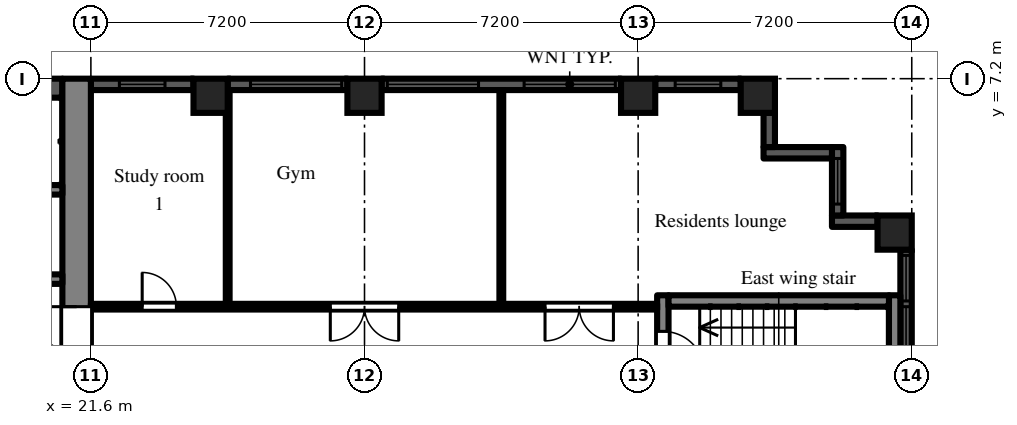
"""IFC4 building model, lengths in metres.
Left out: names, types, materials, properties, quantities, classifications, styles, units other than length and angle.
Written with IfcOpenShell. Run it as: python <this file> out.ifc"""

import sys

from ifc_helpers import new_model, si_unit, direction, frame, frame_2d, origin, origin_2d, place, context, subcontext, project, spatial, rectangle, extrude, element, fill, save


model = new_model("IFC4")
c1 = context("Model", 3, precision=1e-05, world=origin(), true_north=direction((0.0, 1.0)))
c2 = subcontext(c1, "Body", "Model", "MODEL_VIEW")
j1 = project(units=[si_unit("LENGTHUNIT", "METRE"), si_unit("PLANEANGLEUNIT", "RADIAN")], contexts=[c1])
p1 = place(None, origin())
s1 = spatial("IfcSite", under=j1, at=p1, CompositionType="ELEMENT")
p2 = place(p1, origin())
s2 = spatial("IfcBuilding", under=s1, at=p2, CompositionType="ELEMENT")
p3 = place(p2, frame((0.0, 0.0, 69.9)))
s3 = spatial("IfcBuildingStorey", under=s2, at=p3, CompositionType="ELEMENT", Elevation=69.9)
for number, where, z_axis, x_axis in (
    (1, (24.75, 6.75, 0.0), (0.0, 0.0, 1.0), (1.0, 0.0, 0.0)),
    (2, (28.8, 6.75, 0.0), (0.0, 0.0, 1.0), (1.0, 0.0, 0.0)),
    (3, (36.0, 6.75, 0.0), (0.0, 0.0, 1.0), (1.0, 0.0, 0.0)),
    (4, (39.15, 6.75, 0.0), (0.0, 0.0, 1.0), (1.0, 0.0, 0.0)),
    (5, (42.75, 3.15, 0.0), (0.0, 0.0, 1.0), (1.0, 0.0, 0.0)),
):
    element("IfcColumn", number, at=place(p3, frame(where, z_axis=z_axis, x_axis=x_axis)), inside=s3, PredefinedType="COLUMN", context=c2, shape_type="SweptSolid", body=[
        extrude(rectangle(XDim=0.9, YDim=0.9, at=origin_2d()), origin(), (0.0, 0.0, 1.0), 3.0),
    ])
p4 = place(p3, frame((43.05, -2.7, 0.0), z_axis=(0.0, 0.0, 1.0), x_axis=(0.0, 1.0, 0.0)))
e6 = element("IfcWall", 6, at=p4, inside=s3, PredefinedType="SOLIDWALL", context=c2, shape_type="SweptSolid", body=[
    extrude(rectangle(XDim=5.4, YDim=0.3, at=frame_2d((2.7, 0.0))), origin(), (0.0, 0.0, 1.0), 2.1),
])
p5 = place(p4, frame((1.5, 0.0, 0.2)))
e7 = element("IfcOpeningElement", 7, at=p5, cuts=e6, PredefinedType="OPENING", context=c2, shape_type="SweptSolid", body=[
    extrude(rectangle(XDim=2.4, YDim=1.85, at=frame_2d((1.2, 0.925))), frame((0.0, 0.16, 0.0), z_axis=(0.0, -1.0, 0.0), x_axis=(1.0, 0.0, 0.0)), (0.0, 0.0, 1.0), 0.32),
])
p6 = place(p4, frame((4.05, 0.0, 0.2)))
e8 = element("IfcOpeningElement", 8, at=p6, cuts=e6, PredefinedType="OPENING", context=c2, shape_type="SweptSolid", body=[
    extrude(rectangle(XDim=1.2, YDim=1.85, at=frame_2d((0.6, 0.925))), frame((0.0, 0.16, 0.0), z_axis=(0.0, -1.0, 0.0), x_axis=(1.0, 0.0, 0.0)), (0.0, 0.0, 1.0), 0.32),
])
p7 = place(p3, frame((42.3, 3.45, 0.0), z_axis=(0.0, 0.0, 1.0), x_axis=(-1.0, 0.0, 0.0)))
e9 = element("IfcWall", 9, at=p7, inside=s3, PredefinedType="SOLIDWALL", context=c2, shape_type="SweptSolid", body=[
    extrude(rectangle(XDim=1.2, YDim=0.3, at=frame_2d((0.6, 0.0))), origin(), (0.0, 0.0, 1.0), 2.575),
])
p8 = place(p3, frame((41.25, 3.6, 0.0), z_axis=(0.0, 0.0, 1.0), x_axis=(0.0, 1.0, 0.0)))
e10 = element("IfcWall", 10, at=p8, inside=s3, PredefinedType="SOLIDWALL", context=c2, shape_type="SweptSolid", body=[
    extrude(rectangle(XDim=1.8, YDim=0.3, at=frame_2d((0.9, 0.0))), origin(), (0.0, 0.0, 1.0), 2.575),
])
p9 = place(p8, frame((0.3, 0.0, 0.2)))
e11 = element("IfcOpeningElement", 11, at=p9, cuts=e10, PredefinedType="OPENING", context=c2, shape_type="SweptSolid", body=[
    extrude(rectangle(XDim=1.2, YDim=1.85, at=frame_2d((0.6, 0.925))), frame((0.0, 0.16, 0.0), z_axis=(0.0, -1.0, 0.0), x_axis=(1.0, 0.0, 0.0)), (0.0, 0.0, 1.0), 0.32),
])
p10 = place(p3, frame((41.1, 5.25, 0.0), z_axis=(0.0, 0.0, 1.0), x_axis=(-1.0, 0.0, 0.0)))
e12 = element("IfcWall", 12, at=p10, inside=s3, PredefinedType="SOLIDWALL", context=c2, shape_type="SweptSolid", body=[
    extrude(rectangle(XDim=1.8, YDim=0.3, at=frame_2d((0.9, 0.0))), origin(), (0.0, 0.0, 1.0), 2.575),
])
p11 = place(p3, frame((39.45, 5.4, 0.0), z_axis=(0.0, 0.0, 1.0), x_axis=(0.0, 1.0, 0.0)))
e13 = element("IfcWall", 13, at=p11, inside=s3, PredefinedType="SOLIDWALL", context=c2, shape_type="SweptSolid", body=[
    extrude(rectangle(XDim=0.9, YDim=0.3, at=frame_2d((0.45, 0.0))), origin(), (0.0, 0.0, 1.0), 2.575),
])
p12 = place(p3, frame((38.7, 7.05, 0.0), z_axis=(0.0, 0.0, 1.0), x_axis=(-1.0, 0.0, 0.0)))
e14 = element("IfcWall", 14, at=p12, inside=s3, PredefinedType="SOLIDWALL", context=c2, shape_type="SweptSolid", body=[
    extrude(rectangle(XDim=2.25, YDim=0.3, at=frame_2d((1.125, 0.0))), origin(), (0.0, 0.0, 1.0), 2.1),
])
p13 = place(p12, frame((0.525, 0.0, 0.2)))
e15 = element("IfcOpeningElement", 15, at=p13, cuts=e14, PredefinedType="OPENING", context=c2, shape_type="SweptSolid", body=[
    extrude(rectangle(XDim=1.2, YDim=1.85, at=frame_2d((0.6, 0.925))), frame((0.0, 0.16, 0.0), z_axis=(0.0, -1.0, 0.0), x_axis=(1.0, 0.0, 0.0)), (0.0, 0.0, 1.0), 0.32),
])
p14 = place(p3, frame((35.55, 7.05, 0.0), z_axis=(0.0, 0.0, 1.0), x_axis=(-1.0, 0.0, 0.0)))
e16 = element("IfcWall", 16, at=p14, inside=s3, PredefinedType="SOLIDWALL", context=c2, shape_type="SweptSolid", body=[
    extrude(rectangle(XDim=6.3, YDim=0.3, at=frame_2d((3.15, 0.0))), origin(), (0.0, 0.0, 1.0), 2.1),
])
p15 = place(p14, frame((0.15, 0.0, 0.2)))
e17 = element("IfcOpeningElement", 17, at=p15, cuts=e16, PredefinedType="OPENING", context=c2, shape_type="SweptSolid", body=[
    extrude(rectangle(XDim=2.4, YDim=1.85, at=frame_2d((1.2, 0.925))), frame((0.0, 0.16, 0.0), z_axis=(0.0, -1.0, 0.0), x_axis=(1.0, 0.0, 0.0)), (0.0, 0.0, 1.0), 0.32),
])
p16 = place(p14, frame((3.75, 0.0, 0.2)))
e18 = element("IfcOpeningElement", 18, at=p16, cuts=e16, PredefinedType="OPENING", context=c2, shape_type="SweptSolid", body=[
    extrude(rectangle(XDim=2.4, YDim=1.85, at=frame_2d((1.2, 0.925))), frame((0.0, 0.16, 0.0), z_axis=(0.0, -1.0, 0.0), x_axis=(1.0, 0.0, 0.0)), (0.0, 0.0, 1.0), 0.32),
])
p17 = place(p3, frame((28.35, 7.05, 0.0), z_axis=(0.0, 0.0, 1.0), x_axis=(-1.0, 0.0, 0.0)))
e19 = element("IfcWall", 19, at=p17, inside=s3, PredefinedType="SOLIDWALL", context=c2, shape_type="SweptSolid", body=[
    extrude(rectangle(XDim=3.15, YDim=0.3, at=frame_2d((1.575, 0.0))), origin(), (0.0, 0.0, 1.0), 2.1),
])
p18 = place(p17, frame((0.15, 0.0, 0.2)))
e20 = element("IfcOpeningElement", 20, at=p18, cuts=e19, PredefinedType="OPENING", context=c2, shape_type="SweptSolid", body=[
    extrude(rectangle(XDim=2.4, YDim=1.85, at=frame_2d((1.2, 0.925))), frame((0.0, 0.16, 0.0), z_axis=(0.0, -1.0, 0.0), x_axis=(1.0, 0.0, 0.0)), (0.0, 0.0, 1.0), 0.32),
])
p19 = place(p3, frame((24.3, 7.05, 0.0), z_axis=(0.0, 0.0, 1.0), x_axis=(-1.0, 0.0, 0.0)))
e21 = element("IfcWall", 21, at=p19, inside=s3, PredefinedType="SOLIDWALL", context=c2, shape_type="SweptSolid", body=[
    extrude(rectangle(XDim=2.7, YDim=0.3, at=frame_2d((1.35, 0.0))), origin(), (0.0, 0.0, 1.0), 2.1),
])
p20 = place(p19, frame((0.75, 0.0, 0.2)))
e22 = element("IfcOpeningElement", 22, at=p20, cuts=e21, PredefinedType="OPENING", context=c2, shape_type="SweptSolid", body=[
    extrude(rectangle(XDim=1.2, YDim=1.85, at=frame_2d((0.6, 0.925))), frame((0.0, 0.16, 0.0), z_axis=(0.0, -1.0, 0.0), x_axis=(1.0, 0.0, 0.0)), (0.0, 0.0, 1.0), 0.32),
])
p21 = place(p3, frame((21.225, -7.2, 0.0), z_axis=(0.0, 0.0, 1.0), x_axis=(0.0, 1.0, 0.0)))
e23 = element("IfcWall", 23, at=p21, inside=s3, PredefinedType="SHEAR", context=c2, shape_type="SweptSolid", body=[
    extrude(rectangle(XDim=14.4, YDim=0.75, at=frame_2d((7.2, 0.0))), origin(), (0.0, 0.0, 1.0), 2.575),
])
p22 = place(p21, frame((6.0, 0.0, 0.0)))
e24 = element("IfcOpeningElement", 24, at=p22, cuts=e23, PredefinedType="OPENING", context=c2, shape_type="SweptSolid", body=[
    extrude(rectangle(XDim=2.4, YDim=2.2, at=frame_2d((1.2, 1.1))), frame((0.0, 0.385, 0.0), z_axis=(0.0, -1.0, 0.0), x_axis=(1.0, 0.0, 0.0)), (0.0, 0.0, 1.0), 0.77),
])
p23 = place(p3, frame((7.9, 6.95, 0.0), z_axis=(0.0, 0.0, 1.0), x_axis=(1.0, 0.0, 0.0)))
e25 = element("IfcWall", 25, at=p23, inside=s3, PredefinedType="SHEAR", context=c2, shape_type="SweptSolid", body=[
    extrude(rectangle(XDim=12.95, YDim=0.5, at=frame_2d((6.475, 0.0))), origin(), (0.0, 0.0, 1.0), 2.575),
])
p24 = place(p3, frame((7.9, 1.925, 0.0), z_axis=(0.0, 0.0, 1.0), x_axis=(1.0, 0.0, 0.0)))
e26 = element("IfcWall", 26, at=p24, inside=s3, PredefinedType="SHEAR", context=c2, shape_type="SweptSolid", body=[
    extrude(rectangle(XDim=12.95, YDim=0.25, at=frame_2d((6.475, 0.0))), origin(), (0.0, 0.0, 1.0), 2.575),
])
p25 = place(p24, frame((0.525, 0.0, 0.0)))
e27 = element("IfcOpeningElement", 27, at=p25, cuts=e26, PredefinedType="OPENING", context=c2, shape_type="SweptSolid", body=[
    extrude(rectangle(XDim=0.9, YDim=2.1, at=frame_2d((0.45, 1.05))), frame((0.0, 0.135, 0.0), z_axis=(0.0, -1.0, 0.0), x_axis=(1.0, 0.0, 0.0)), (0.0, 0.0, 1.0), 0.27),
])
p26 = place(p24, frame((2.625, 0.0, 0.0)))
e28 = element("IfcOpeningElement", 28, at=p26, cuts=e26, PredefinedType="OPENING", context=c2, shape_type="SweptSolid", body=[
    extrude(rectangle(XDim=1.1, YDim=2.1, at=frame_2d((0.55, 1.05))), frame((0.0, 0.135, 0.0), z_axis=(0.0, -1.0, 0.0), x_axis=(1.0, 0.0, 0.0)), (0.0, 0.0, 1.0), 0.27),
])
p27 = place(p24, frame((7.125, 0.0, 0.0)))
e29 = element("IfcOpeningElement", 29, at=p27, cuts=e26, PredefinedType="OPENING", context=c2, shape_type="SweptSolid", body=[
    extrude(rectangle(XDim=0.9, YDim=2.1, at=frame_2d((0.45, 1.05))), frame((0.0, 0.135, 0.0), z_axis=(0.0, -1.0, 0.0), x_axis=(1.0, 0.0, 0.0)), (0.0, 0.0, 1.0), 0.27),
])
p28 = place(p3, frame((12.3, 4.275, 0.0), z_axis=(0.0, 0.0, 1.0), x_axis=(1.0, 0.0, 0.0)))
e30 = element("IfcWall", 30, at=p28, inside=s3, PredefinedType="SHEAR", context=c2, shape_type="SweptSolid", body=[
    extrude(rectangle(XDim=8.55, YDim=0.25, at=frame_2d((4.275, 0.0))), origin(), (0.0, 0.0, 1.0), 2.575),
])
p29 = place(p3, frame((36.65, -1.5, 0.0), z_axis=(0.0, 0.0, 1.0), x_axis=(0.0, 1.0, 0.0)))
e31 = element("IfcWall", 31, at=p29, inside=s3, PredefinedType="SHEAR", context=c2, shape_type="SweptSolid", body=[
    extrude(rectangle(XDim=3.0, YDim=0.3, at=frame_2d((1.5, 0.0))), origin(), (0.0, 0.0, 1.0), 2.575),
])
p30 = place(p29, frame((0.95, 0.0, 0.0)))
e32 = element("IfcOpeningElement", 32, at=p30, cuts=e31, PredefinedType="OPENING", context=c2, shape_type="SweptSolid", body=[
    extrude(rectangle(XDim=1.1, YDim=2.1, at=frame_2d((0.55, 1.05))), frame((0.0, 0.16, 0.0), z_axis=(0.0, -1.0, 0.0), x_axis=(1.0, 0.0, 0.0)), (0.0, 0.0, 1.0), 0.32),
])
p31 = place(p3, frame((42.75, -1.5, 0.0), z_axis=(0.0, 0.0, 1.0), x_axis=(0.0, 1.0, 0.0)))
e33 = element("IfcWall", 33, at=p31, inside=s3, PredefinedType="SHEAR", context=c2, shape_type="SweptSolid", body=[
    extrude(rectangle(XDim=3.0, YDim=0.3, at=frame_2d((1.5, 0.0))), origin(), (0.0, 0.0, 1.0), 2.575),
])
p32 = place(p3, frame((36.8, 1.35, 0.0), z_axis=(0.0, 0.0, 1.0), x_axis=(1.0, 0.0, 0.0)))
e34 = element("IfcWall", 34, at=p32, inside=s3, PredefinedType="SHEAR", context=c2, shape_type="SweptSolid", body=[
    extrude(rectangle(XDim=5.8, YDim=0.3, at=frame_2d((2.9, 0.0))), origin(), (0.0, 0.0, 1.0), 2.575),
])
p33 = place(p3, frame((21.6, 1.2, 0.0), z_axis=(0.0, 0.0, 1.0), x_axis=(1.0, 0.0, 0.0)))
e35 = element("IfcWall", 35, at=p33, inside=s3, PredefinedType="PARTITIONING", context=c2, shape_type="SweptSolid", body=[
    extrude(rectangle(XDim=14.9, YDim=0.15, at=frame_2d((7.45, 0.0))), origin(), (0.0, 0.0, 1.0), 2.575),
])
p34 = place(p33, frame((1.35, 0.0, 0.0)))
e36 = element("IfcOpeningElement", 36, at=p34, cuts=e35, PredefinedType="OPENING", context=c2, shape_type="SweptSolid", body=[
    extrude(rectangle(XDim=0.9, YDim=2.1, at=frame_2d((0.45, 1.05))), frame((0.0, 0.085, 0.0), z_axis=(0.0, -1.0, 0.0), x_axis=(1.0, 0.0, 0.0)), (0.0, 0.0, 1.0), 0.17),
])
p35 = place(p33, frame((6.3, 0.0, 0.0)))
e37 = element("IfcOpeningElement", 37, at=p35, cuts=e35, PredefinedType="OPENING", context=c2, shape_type="SweptSolid", body=[
    extrude(rectangle(XDim=1.8, YDim=2.1, at=frame_2d((0.9, 1.05))), frame((0.0, 0.085, 0.0), z_axis=(0.0, -1.0, 0.0), x_axis=(1.0, 0.0, 0.0)), (0.0, 0.0, 1.0), 0.17),
])
p36 = place(p33, frame((11.95, 0.0, 0.0)))
e38 = element("IfcOpeningElement", 38, at=p36, cuts=e35, PredefinedType="OPENING", context=c2, shape_type="SweptSolid", body=[
    extrude(rectangle(XDim=1.8, YDim=2.1, at=frame_2d((0.9, 1.05))), frame((0.0, 0.085, 0.0), z_axis=(0.0, -1.0, 0.0), x_axis=(1.0, 0.0, 0.0)), (0.0, 0.0, 1.0), 0.17),
])
for number, where, z_axis, x_axis in (
    (39, (25.2, 1.275, 0.0), (0.0, 0.0, 1.0), (0.0, 1.0, 0.0)),
    (40, (32.4, 1.275, 0.0), (0.0, 0.0, 1.0), (0.0, 1.0, 0.0)),
):
    element("IfcWall", number, at=place(p3, frame(where, z_axis=z_axis, x_axis=x_axis)), inside=s3, PredefinedType="PARTITIONING", context=c2, shape_type="SweptSolid", body=[
        extrude(rectangle(XDim=5.625, YDim=0.1, at=frame_2d((2.812, 0.0))), origin(), (0.0, 0.0, 1.0), 2.575),
    ])
p37 = place(p5, origin())
e41 = element("IfcWindow", 41, at=p37, inside=s3, PartitioningType="SINGLE_PANEL", PredefinedType="WINDOW", context=c2, shape_type="SweptSolid", body=[
    extrude(rectangle(XDim=2.4, YDim=1.85, at=frame_2d((1.2, 0.925))), frame((0.0, 0.03, 0.0), z_axis=(0.0, -1.0, 0.0), x_axis=(1.0, 0.0, 0.0)), (0.0, 0.0, 1.0), 0.06),
])
fill(e7, e41)
p38 = place(p6, origin())
e42 = element("IfcWindow", 42, at=p38, inside=s3, PartitioningType="SINGLE_PANEL", PredefinedType="WINDOW", context=c2, shape_type="SweptSolid", body=[
    extrude(rectangle(XDim=1.2, YDim=1.85, at=frame_2d((0.6, 0.925))), frame((0.0, 0.03, 0.0), z_axis=(0.0, -1.0, 0.0), x_axis=(1.0, 0.0, 0.0)), (0.0, 0.0, 1.0), 0.06),
])
fill(e8, e42)
p39 = place(p9, origin())
e43 = element("IfcWindow", 43, at=p39, inside=s3, PartitioningType="SINGLE_PANEL", PredefinedType="WINDOW", context=c2, shape_type="SweptSolid", body=[
    extrude(rectangle(XDim=1.2, YDim=1.85, at=frame_2d((0.6, 0.925))), frame((0.0, 0.03, 0.0), z_axis=(0.0, -1.0, 0.0), x_axis=(1.0, 0.0, 0.0)), (0.0, 0.0, 1.0), 0.06),
])
fill(e11, e43)
p40 = place(p13, origin())
e44 = element("IfcWindow", 44, at=p40, inside=s3, PartitioningType="SINGLE_PANEL", PredefinedType="WINDOW", context=c2, shape_type="SweptSolid", body=[
    extrude(rectangle(XDim=1.2, YDim=1.85, at=frame_2d((0.6, 0.925))), frame((0.0, 0.03, 0.0), z_axis=(0.0, -1.0, 0.0), x_axis=(1.0, 0.0, 0.0)), (0.0, 0.0, 1.0), 0.06),
])
fill(e15, e44)
p41 = place(p15, origin())
e45 = element("IfcWindow", 45, at=p41, inside=s3, PartitioningType="SINGLE_PANEL", PredefinedType="WINDOW", context=c2, shape_type="SweptSolid", body=[
    extrude(rectangle(XDim=2.4, YDim=1.85, at=frame_2d((1.2, 0.925))), frame((0.0, 0.03, 0.0), z_axis=(0.0, -1.0, 0.0), x_axis=(1.0, 0.0, 0.0)), (0.0, 0.0, 1.0), 0.06),
])
fill(e17, e45)
p42 = place(p16, origin())
e46 = element("IfcWindow", 46, at=p42, inside=s3, PartitioningType="SINGLE_PANEL", PredefinedType="WINDOW", context=c2, shape_type="SweptSolid", body=[
    extrude(rectangle(XDim=2.4, YDim=1.85, at=frame_2d((1.2, 0.925))), frame((0.0, 0.03, 0.0), z_axis=(0.0, -1.0, 0.0), x_axis=(1.0, 0.0, 0.0)), (0.0, 0.0, 1.0), 0.06),
])
fill(e18, e46)
p43 = place(p18, origin())
e47 = element("IfcWindow", 47, at=p43, inside=s3, PartitioningType="SINGLE_PANEL", PredefinedType="WINDOW", context=c2, shape_type="SweptSolid", body=[
    extrude(rectangle(XDim=2.4, YDim=1.85, at=frame_2d((1.2, 0.925))), frame((0.0, 0.03, 0.0), z_axis=(0.0, -1.0, 0.0), x_axis=(1.0, 0.0, 0.0)), (0.0, 0.0, 1.0), 0.06),
])
fill(e20, e47)
p44 = place(p20, origin())
e48 = element("IfcWindow", 48, at=p44, inside=s3, PartitioningType="SINGLE_PANEL", PredefinedType="WINDOW", context=c2, shape_type="SweptSolid", body=[
    extrude(rectangle(XDim=1.2, YDim=1.85, at=frame_2d((0.6, 0.925))), frame((0.0, 0.03, 0.0), z_axis=(0.0, -1.0, 0.0), x_axis=(1.0, 0.0, 0.0)), (0.0, 0.0, 1.0), 0.06),
])
fill(e22, e48)
p45 = place(p22, origin())
e49 = element("IfcDoor", 49, at=p45, inside=s3, OperationType="DOUBLE_DOOR_DOUBLE_SWING", PredefinedType="DOOR", context=c2, shape_type="SweptSolid", body=[
    extrude(rectangle(XDim=2.4, YDim=2.2, at=frame_2d((1.2, 1.1))), frame((0.0, 0.025, 0.0), z_axis=(0.0, -1.0, 0.0), x_axis=(1.0, 0.0, 0.0)), (0.0, 0.0, 1.0), 0.05),
])
fill(e24, e49)
p46 = place(p30, frame((1.1, 0.0, 0.0), z_axis=(0.0, 0.0, 1.0), x_axis=(-1.0, 0.0, 0.0)))
e50 = element("IfcDoor", 50, at=p46, inside=s3, OperationType="SINGLE_SWING_RIGHT", PredefinedType="DOOR", context=c2, shape_type="SweptSolid", body=[
    extrude(rectangle(XDim=1.1, YDim=2.1, at=frame_2d((0.55, 1.05))), frame((0.0, 0.025, 0.0), z_axis=(0.0, -1.0, 0.0), x_axis=(1.0, 0.0, 0.0)), (0.0, 0.0, 1.0), 0.05),
])
fill(e32, e50)
p47 = place(p34, origin())
e51 = element("IfcDoor", 51, at=p47, inside=s3, OperationType="SINGLE_SWING_LEFT", PredefinedType="DOOR", context=c2, shape_type="SweptSolid", body=[
    extrude(rectangle(XDim=0.9, YDim=2.1, at=frame_2d((0.45, 1.05))), frame((0.0, 0.025, 0.0), z_axis=(0.0, -1.0, 0.0), x_axis=(1.0, 0.0, 0.0)), (0.0, 0.0, 1.0), 0.05),
])
fill(e36, e51)
p48 = place(p35, frame((1.8, 0.0, 0.0), z_axis=(0.0, 0.0, 1.0), x_axis=(-1.0, 0.0, 0.0)))
e52 = element("IfcDoor", 52, at=p48, inside=s3, OperationType="DOUBLE_DOOR_DOUBLE_SWING", PredefinedType="DOOR", context=c2, shape_type="SweptSolid", body=[
    extrude(rectangle(XDim=1.8, YDim=2.1, at=frame_2d((0.9, 1.05))), frame((0.0, 0.025, 0.0), z_axis=(0.0, -1.0, 0.0), x_axis=(1.0, 0.0, 0.0)), (0.0, 0.0, 1.0), 0.05),
])
fill(e37, e52)
p49 = place(p36, frame((1.8, 0.0, 0.0), z_axis=(0.0, 0.0, 1.0), x_axis=(-1.0, 0.0, 0.0)))
e53 = element("IfcDoor", 53, at=p49, inside=s3, OperationType="DOUBLE_DOOR_DOUBLE_SWING", PredefinedType="DOOR", context=c2, shape_type="SweptSolid", body=[
    extrude(rectangle(XDim=1.8, YDim=2.1, at=frame_2d((0.9, 1.05))), frame((0.0, 0.025, 0.0), z_axis=(0.0, -1.0, 0.0), x_axis=(1.0, 0.0, 0.0)), (0.0, 0.0, 1.0), 0.05),
])
fill(e38, e53)
save(model, sys.argv[1])
